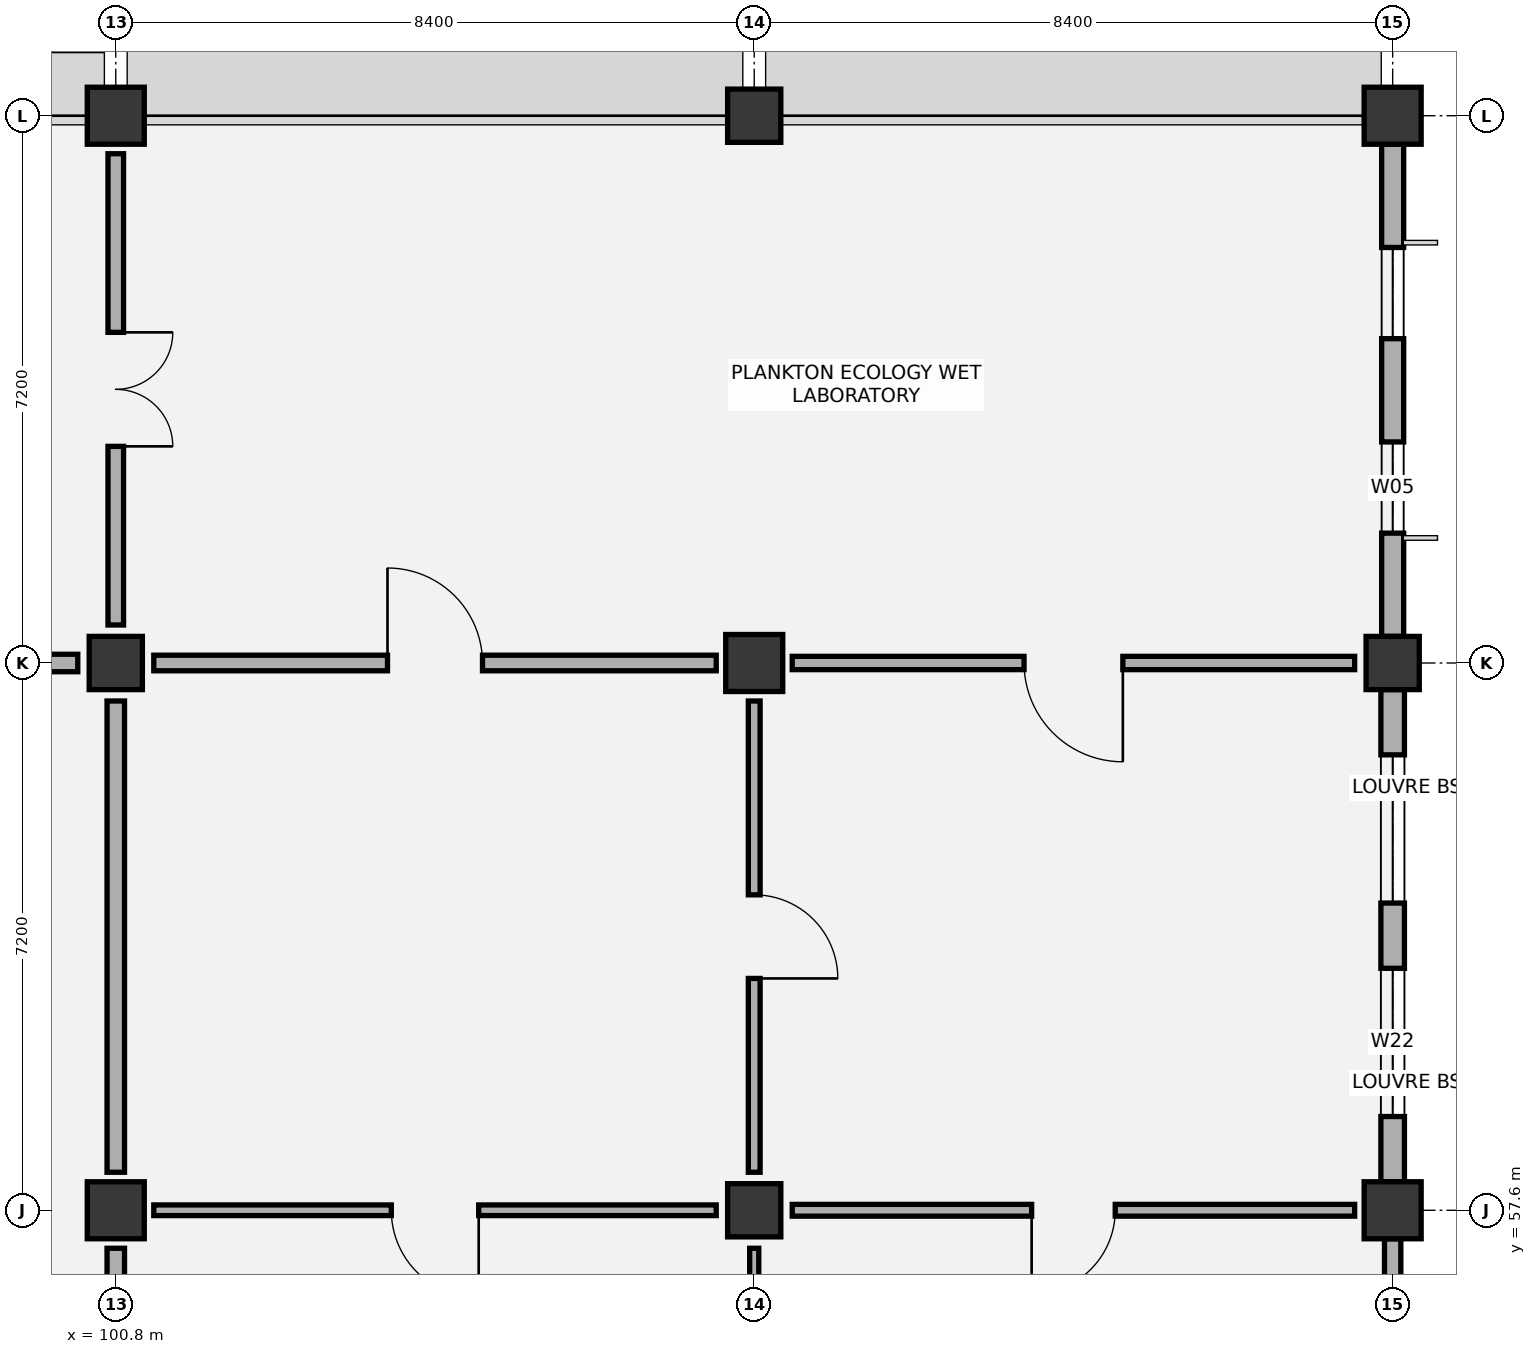
"""IFC4 building model, lengths in metres.
Left out: names, types, materials, properties, quantities, classifications, styles, units other than length and angle.
Written with IfcOpenShell. Run it as: python <this file> out.ifc"""

import sys

from ifc_helpers import new_model, si_unit, direction, frame, frame_2d, origin, origin_2d, place, context, subcontext, project, spatial, rectangle, extrude, element, fill, save


model = new_model("IFC4")
c1 = context("Model", 3, precision=1e-05, world=origin(), true_north=direction((0.0, 1.0)))
c2 = subcontext(c1, "Body", "Model", "MODEL_VIEW")
j1 = project(units=[si_unit("LENGTHUNIT", "METRE"), si_unit("PLANEANGLEUNIT", "RADIAN")], contexts=[c1])
p1 = place(None, origin())
s1 = spatial("IfcSite", under=j1, at=p1, CompositionType="ELEMENT")
p2 = place(p1, origin())
s2 = spatial("IfcBuilding", under=s1, at=p2, CompositionType="ELEMENT")
p3 = place(p2, frame((0.0, 0.0, 31.2)))
s3 = spatial("IfcBuildingStorey", under=s2, at=p3, CompositionType="ELEMENT", Elevation=31.2)
p4 = place(p3, frame((100.8, 57.6, 0.0), z_axis=(0.0, 0.0, 1.0), x_axis=(1.0, 0.0, 0.0)))
e1 = element("IfcColumn", 1, at=p4, inside=s3, PredefinedType="COLUMN", context=c2, shape_type="SweptSolid", body=[
    extrude(rectangle(XDim=0.75, YDim=0.75, at=origin_2d()), origin(), (0.0, 0.0, 1.0), 4.2),
])
p5 = place(p3, frame((100.8, 64.8, 0.0), z_axis=(0.0, 0.0, 1.0), x_axis=(1.0, 0.0, 0.0)))
e2 = element("IfcColumn", 2, at=p5, inside=s3, PredefinedType="COLUMN", context=c2, shape_type="SweptSolid", body=[
    extrude(rectangle(XDim=0.7, YDim=0.7, at=origin_2d()), origin(), (0.0, 0.0, 1.0), 4.2),
])
p6 = place(p3, frame((100.8, 72.0, 0.0), z_axis=(0.0, 0.0, 1.0), x_axis=(1.0, 0.0, 0.0)))
e3 = element("IfcColumn", 3, at=p6, inside=s3, PredefinedType="COLUMN", context=c2, shape_type="SweptSolid", body=[
    extrude(rectangle(XDim=0.75, YDim=0.75, at=origin_2d()), origin(), (0.0, 0.0, 1.0), 4.2),
])
p7 = place(p3, frame((109.2, 57.6, 0.0), z_axis=(0.0, 0.0, 1.0), x_axis=(1.0, 0.0, 0.0)))
e4 = element("IfcColumn", 4, at=p7, inside=s3, PredefinedType="COLUMN", context=c2, shape_type="SweptSolid", body=[
    extrude(rectangle(XDim=0.7, YDim=0.7, at=origin_2d()), origin(), (0.0, 0.0, 1.0), 4.2),
])
p8 = place(p3, frame((109.2, 64.8, 0.0), z_axis=(0.0, 0.0, 1.0), x_axis=(1.0, 0.0, 0.0)))
e5 = element("IfcColumn", 5, at=p8, inside=s3, PredefinedType="COLUMN", context=c2, shape_type="SweptSolid", body=[
    extrude(rectangle(XDim=0.75, YDim=0.75, at=origin_2d()), origin(), (0.0, 0.0, 1.0), 4.2),
])
p9 = place(p3, frame((109.2, 72.0, 0.0), z_axis=(0.0, 0.0, 1.0), x_axis=(1.0, 0.0, 0.0)))
e6 = element("IfcColumn", 6, at=p9, inside=s3, PredefinedType="COLUMN", context=c2, shape_type="SweptSolid", body=[
    extrude(rectangle(XDim=0.7, YDim=0.7, at=origin_2d()), origin(), (0.0, 0.0, 1.0), 4.2),
])
p10 = place(p3, frame((117.6, 57.6, 0.0), z_axis=(0.0, 0.0, 1.0), x_axis=(1.0, 0.0, 0.0)))
e7 = element("IfcColumn", 7, at=p10, inside=s3, PredefinedType="COLUMN", context=c2, shape_type="SweptSolid", body=[
    extrude(rectangle(XDim=0.75, YDim=0.75, at=origin_2d()), origin(), (0.0, 0.0, 1.0), 4.2),
])
p11 = place(p3, frame((117.6, 64.8, 0.0), z_axis=(0.0, 0.0, 1.0), x_axis=(1.0, 0.0, 0.0)))
e8 = element("IfcColumn", 8, at=p11, inside=s3, PredefinedType="COLUMN", context=c2, shape_type="SweptSolid", body=[
    extrude(rectangle(XDim=0.7, YDim=0.7, at=origin_2d()), origin(), (0.0, 0.0, 1.0), 4.2),
])
p12 = place(p3, frame((117.6, 72.0, 0.0), z_axis=(0.0, 0.0, 1.0), x_axis=(1.0, 0.0, 0.0)))
e9 = element("IfcColumn", 9, at=p12, inside=s3, PredefinedType="COLUMN", context=c2, shape_type="SweptSolid", body=[
    extrude(rectangle(XDim=0.75, YDim=0.75, at=origin_2d()), origin(), (0.0, 0.0, 1.0), 4.2),
])
p13 = place(p3, frame((117.6, 50.75, 0.0), z_axis=(0.0, 0.0, 1.0), x_axis=(0.0, 1.0, 0.0)))
e10 = element("IfcWall", 10, at=p13, inside=s3, PredefinedType="SOLIDWALL", context=c2, shape_type="SweptSolid", body=[
    extrude(rectangle(XDim=6.475, YDim=0.215, at=frame_2d((3.238, 0.0))), origin(), (0.0, 0.0, 1.0), 3.365),
])
p14 = place(p3, frame((117.6, 57.975, 0.0), z_axis=(0.0, 0.0, 1.0), x_axis=(0.0, 1.0, 0.0)))
e11 = element("IfcWall", 11, at=p14, inside=s3, PredefinedType="SOLIDWALL", context=c2, shape_type="SweptSolid", body=[
    extrude(rectangle(XDim=6.475, YDim=0.31, at=frame_2d((3.237, 0.0))), origin(), (0.0, 0.0, 1.0), 3.365),
])
p15 = place(p14, frame((0.858, 0.0, 0.9)))
e12 = element("IfcOpeningElement", 12, at=p15, cuts=e11, PredefinedType="OPENING", context=c2, shape_type="SweptSolid", body=[
    extrude(rectangle(XDim=1.95, YDim=1.95, at=frame_2d((0.975, 0.975))), frame((0.0, 0.165, 0.0), z_axis=(0.0, -1.0, 0.0), x_axis=(1.0, 0.0, 0.0)), (0.0, 0.0, 1.0), 0.33),
])
p16 = place(p14, frame((3.667, 0.0, 0.9)))
e13 = element("IfcOpeningElement", 13, at=p16, cuts=e11, PredefinedType="OPENING", context=c2, shape_type="SweptSolid", body=[
    extrude(rectangle(XDim=1.95, YDim=1.95, at=frame_2d((0.975, 0.975))), frame((0.0, 0.165, 0.0), z_axis=(0.0, -1.0, 0.0), x_axis=(1.0, 0.0, 0.0)), (0.0, 0.0, 1.0), 0.33),
])
p17 = place(p3, frame((117.6, 65.15, 0.0), z_axis=(0.0, 0.0, 1.0), x_axis=(0.0, 1.0, 0.0)))
e14 = element("IfcWall", 14, at=p17, inside=s3, PredefinedType="SOLIDWALL", context=c2, shape_type="SweptSolid", body=[
    extrude(rectangle(XDim=6.475, YDim=0.29, at=frame_2d((3.238, 0.0))), origin(), (0.0, 0.0, 1.0), 3.365),
])
p18 = place(p17, frame((1.358, 0.0, 0.9)))
e15 = element("IfcOpeningElement", 15, at=p18, cuts=e14, PredefinedType="OPENING", context=c2, shape_type="SweptSolid", body=[
    extrude(rectangle(XDim=1.2, YDim=1.8, at=frame_2d((0.6, 0.9))), frame((0.0, 0.155, 0.0), z_axis=(0.0, -1.0, 0.0), x_axis=(1.0, 0.0, 0.0)), (0.0, 0.0, 1.0), 0.31),
])
p19 = place(p17, frame((3.917, 0.0, 0.9)))
e16 = element("IfcOpeningElement", 16, at=p19, cuts=e14, PredefinedType="OPENING", context=c2, shape_type="SweptSolid", body=[
    extrude(rectangle(XDim=1.2, YDim=1.8, at=frame_2d((0.6, 0.9))), frame((0.0, 0.155, 0.0), z_axis=(0.0, -1.0, 0.0), x_axis=(1.0, 0.0, 0.0)), (0.0, 0.0, 1.0), 0.31),
])
p20 = place(p3, frame((100.8, 50.9, 0.0), z_axis=(0.0, 0.0, 1.0), x_axis=(0.0, 1.0, 0.0)))
e17 = element("IfcWall", 17, at=p20, inside=s3, PredefinedType="PARTITIONING", context=c2, shape_type="SweptSolid", body=[
    extrude(rectangle(XDim=6.2, YDim=0.23, at=frame_2d((3.1, 0.0))), origin(), (0.0, 0.0, 1.0), 3.315),
])
p21 = place(p3, frame((100.8, 58.1, 0.0), z_axis=(0.0, 0.0, 1.0), x_axis=(0.0, 1.0, 0.0)))
e18 = element("IfcWall", 18, at=p21, inside=s3, PredefinedType="PARTITIONING", context=c2, shape_type="SweptSolid", body=[
    extrude(rectangle(XDim=6.2, YDim=0.23, at=frame_2d((3.1, 0.0))), origin(), (0.0, 0.0, 1.0), 3.625),
])
p22 = place(p3, frame((92.9, 64.8, 0.0), z_axis=(0.0, 0.0, 1.0), x_axis=(1.0, 0.0, 0.0)))
e19 = element("IfcWall", 19, at=p22, inside=s3, PredefinedType="PARTITIONING", context=c2, shape_type="SweptSolid", body=[
    extrude(rectangle(XDim=7.4, YDim=0.23, at=frame_2d((3.7, 0.0))), origin(), (0.0, 0.0, 1.0), 3.265),
])
p23 = place(p3, frame((100.8, 65.3, 0.0), z_axis=(0.0, 0.0, 1.0), x_axis=(0.0, 1.0, 0.0)))
e20 = element("IfcWall", 20, at=p23, inside=s3, PredefinedType="PARTITIONING", context=c2, shape_type="SweptSolid", body=[
    extrude(rectangle(XDim=6.2, YDim=0.205, at=frame_2d((3.1, 0.0))), origin(), (0.0, 0.0, 1.0), 3.315),
])
p24 = place(p23, frame((2.35, 0.0, 0.0)))
e21 = element("IfcOpeningElement", 21, at=p24, cuts=e20, PredefinedType="OPENING", context=c2, shape_type="SweptSolid", body=[
    extrude(rectangle(XDim=1.5, YDim=2.2, at=frame_2d((0.75, 1.1))), frame((0.0, 0.113, 0.0), z_axis=(0.0, -1.0, 0.0), x_axis=(1.0, 0.0, 0.0)), (0.0, 0.0, 1.0), 0.225),
])
p25 = place(p3, frame((109.2, 50.9, 0.0), z_axis=(0.0, 0.0, 1.0), x_axis=(0.0, 1.0, 0.0)))
e22 = element("IfcWall", 22, at=p25, inside=s3, PredefinedType="PARTITIONING", context=c2, shape_type="SweptSolid", body=[
    extrude(rectangle(XDim=6.2, YDim=0.12, at=frame_2d((3.1, 0.0))), origin(), (0.0, 0.0, 1.0), 3.625),
])
p26 = place(p3, frame((101.3, 57.6, 0.0), z_axis=(0.0, 0.0, 1.0), x_axis=(1.0, 0.0, 0.0)))
e23 = element("IfcWall", 23, at=p26, inside=s3, PredefinedType="PARTITIONING", context=c2, shape_type="SweptSolid", body=[
    extrude(rectangle(XDim=7.4, YDim=0.14, at=frame_2d((3.7, 0.0))), origin(), (0.0, 0.0, 1.0), 3.265),
])
p27 = place(p26, frame((3.125, 0.0, 0.0)))
e24 = element("IfcOpeningElement", 24, at=p27, cuts=e23, PredefinedType="OPENING", context=c2, shape_type="SweptSolid", body=[
    extrude(rectangle(XDim=1.15, YDim=2.1, at=frame_2d((0.575, 1.05))), frame((0.0, 0.08, 0.0), z_axis=(0.0, -1.0, 0.0), x_axis=(1.0, 0.0, 0.0)), (0.0, 0.0, 1.0), 0.16),
])
p28 = place(p3, frame((109.2, 58.1, 0.0), z_axis=(0.0, 0.0, 1.0), x_axis=(0.0, 1.0, 0.0)))
e25 = element("IfcWall", 25, at=p28, inside=s3, PredefinedType="PARTITIONING", context=c2, shape_type="SweptSolid", body=[
    extrude(rectangle(XDim=6.2, YDim=0.155, at=frame_2d((3.1, 0.0))), origin(), (0.0, 0.0, 1.0), 3.315),
])
p29 = place(p28, frame((2.55, 0.0, 0.0)))
e26 = element("IfcOpeningElement", 26, at=p29, cuts=e25, PredefinedType="OPENING", context=c2, shape_type="SweptSolid", body=[
    extrude(rectangle(XDim=1.1, YDim=2.1, at=frame_2d((0.55, 1.05))), frame((0.0, 0.087, 0.0), z_axis=(0.0, -1.0, 0.0), x_axis=(1.0, 0.0, 0.0)), (0.0, 0.0, 1.0), 0.175),
])
p30 = place(p3, frame((101.3, 64.8, 0.0), z_axis=(0.0, 0.0, 1.0), x_axis=(1.0, 0.0, 0.0)))
e27 = element("IfcWall", 27, at=p30, inside=s3, PredefinedType="PARTITIONING", context=c2, shape_type="SweptSolid", body=[
    extrude(rectangle(XDim=7.4, YDim=0.205, at=frame_2d((3.7, 0.0))), origin(), (0.0, 0.0, 1.0), 3.265),
])
p31 = place(p30, frame((3.075, 0.0, 0.0)))
e28 = element("IfcOpeningElement", 28, at=p31, cuts=e27, PredefinedType="OPENING", context=c2, shape_type="SweptSolid", body=[
    extrude(rectangle(XDim=1.25, YDim=2.1, at=frame_2d((0.625, 1.05))), frame((0.0, 0.113, 0.0), z_axis=(0.0, -1.0, 0.0), x_axis=(1.0, 0.0, 0.0)), (0.0, 0.0, 1.0), 0.225),
])
p32 = place(p3, frame((109.7, 57.6, 0.0), z_axis=(0.0, 0.0, 1.0), x_axis=(1.0, 0.0, 0.0)))
e29 = element("IfcWall", 29, at=p32, inside=s3, PredefinedType="PARTITIONING", context=c2, shape_type="SweptSolid", body=[
    extrude(rectangle(XDim=7.4, YDim=0.155, at=frame_2d((3.7, 0.0))), origin(), (0.0, 0.0, 1.0), 3.265),
])
p33 = place(p32, frame((3.15, 0.0, 0.0)))
e30 = element("IfcOpeningElement", 30, at=p33, cuts=e29, PredefinedType="OPENING", context=c2, shape_type="SweptSolid", body=[
    extrude(rectangle(XDim=1.1, YDim=2.1, at=frame_2d((0.55, 1.05))), frame((0.0, 0.087, 0.0), z_axis=(0.0, -1.0, 0.0), x_axis=(1.0, 0.0, 0.0)), (0.0, 0.0, 1.0), 0.175),
])
p34 = place(p3, frame((109.7, 64.8, 0.0), z_axis=(0.0, 0.0, 1.0), x_axis=(1.0, 0.0, 0.0)))
e31 = element("IfcWall", 31, at=p34, inside=s3, PredefinedType="PARTITIONING", context=c2, shape_type="SweptSolid", body=[
    extrude(rectangle(XDim=7.4, YDim=0.175, at=frame_2d((3.7, 0.0))), origin(), (0.0, 0.0, 1.0), 3.265),
])
p35 = place(p34, frame((3.05, 0.0, 0.0)))
e32 = element("IfcOpeningElement", 32, at=p35, cuts=e31, PredefinedType="OPENING", context=c2, shape_type="SweptSolid", body=[
    extrude(rectangle(XDim=1.3, YDim=2.15, at=frame_2d((0.65, 1.075))), frame((0.0, 0.097, 0.0), z_axis=(0.0, -1.0, 0.0), x_axis=(1.0, 0.0, 0.0)), (0.0, 0.0, 1.0), 0.195),
])
p36 = place(p15, origin())
e33 = element("IfcWindow", 33, at=p36, inside=s3, PartitioningType="SINGLE_PANEL", PredefinedType="WINDOW", context=c2, shape_type="SweptSolid", body=[
    extrude(rectangle(XDim=1.95, YDim=1.95, at=frame_2d((0.975, 0.975))), frame((0.0, 0.03, 0.0), z_axis=(0.0, -1.0, 0.0), x_axis=(1.0, 0.0, 0.0)), (0.0, 0.0, 1.0), 0.06),
])
fill(e12, e33)
p37 = place(p16, origin())
e34 = element("IfcWindow", 34, at=p37, inside=s3, PartitioningType="SINGLE_PANEL", PredefinedType="WINDOW", context=c2, shape_type="SweptSolid", body=[
    extrude(rectangle(XDim=1.95, YDim=1.95, at=frame_2d((0.975, 0.975))), frame((0.0, 0.03, 0.0), z_axis=(0.0, -1.0, 0.0), x_axis=(1.0, 0.0, 0.0)), (0.0, 0.0, 1.0), 0.06),
])
fill(e13, e34)
p38 = place(p18, origin())
e35 = element("IfcWindow", 35, at=p38, inside=s3, PartitioningType="SINGLE_PANEL", PredefinedType="WINDOW", context=c2, shape_type="SweptSolid", body=[
    extrude(rectangle(XDim=1.2, YDim=1.8, at=frame_2d((0.6, 0.9))), frame((0.0, 0.03, 0.0), z_axis=(0.0, -1.0, 0.0), x_axis=(1.0, 0.0, 0.0)), (0.0, 0.0, 1.0), 0.06),
])
fill(e15, e35)
p39 = place(p19, origin())
e36 = element("IfcWindow", 36, at=p39, inside=s3, PartitioningType="SINGLE_PANEL", PredefinedType="WINDOW", context=c2, shape_type="SweptSolid", body=[
    extrude(rectangle(XDim=1.2, YDim=1.8, at=frame_2d((0.6, 0.9))), frame((0.0, 0.03, 0.0), z_axis=(0.0, -1.0, 0.0), x_axis=(1.0, 0.0, 0.0)), (0.0, 0.0, 1.0), 0.06),
])
fill(e16, e36)
p40 = place(p24, frame((1.5, 0.0, 0.0), z_axis=(0.0, 0.0, 1.0), x_axis=(-1.0, 0.0, 0.0)))
e37 = element("IfcDoor", 37, at=p40, inside=s3, OperationType="DOUBLE_DOOR_SINGLE_SWING", PredefinedType="DOOR", context=c2, shape_type="SweptSolid", body=[
    extrude(rectangle(XDim=1.5, YDim=2.2, at=frame_2d((0.75, 1.1))), frame((0.0, 0.025, 0.0), z_axis=(0.0, -1.0, 0.0), x_axis=(1.0, 0.0, 0.0)), (0.0, 0.0, 1.0), 0.05),
])
fill(e21, e37)
p41 = place(p27, frame((1.15, 0.0, 0.0), z_axis=(0.0, 0.0, 1.0), x_axis=(-1.0, 0.0, 0.0)))
e38 = element("IfcDoor", 38, at=p41, inside=s3, OperationType="SINGLE_SWING_LEFT", PredefinedType="DOOR", context=c2, shape_type="SweptSolid", body=[
    extrude(rectangle(XDim=1.15, YDim=2.1, at=frame_2d((0.575, 1.05))), frame((0.0, 0.025, 0.0), z_axis=(0.0, -1.0, 0.0), x_axis=(1.0, 0.0, 0.0)), (0.0, 0.0, 1.0), 0.05),
])
fill(e24, e38)
p42 = place(p29, frame((1.1, 0.0, 0.0), z_axis=(0.0, 0.0, 1.0), x_axis=(-1.0, 0.0, 0.0)))
e39 = element("IfcDoor", 39, at=p42, inside=s3, OperationType="SINGLE_SWING_RIGHT", PredefinedType="DOOR", context=c2, shape_type="SweptSolid", body=[
    extrude(rectangle(XDim=1.1, YDim=2.1, at=frame_2d((0.55, 1.05))), frame((0.0, 0.025, 0.0), z_axis=(0.0, -1.0, 0.0), x_axis=(1.0, 0.0, 0.0)), (0.0, 0.0, 1.0), 0.05),
])
fill(e26, e39)
p43 = place(p31, origin())
e40 = element("IfcDoor", 40, at=p43, inside=s3, OperationType="SINGLE_SWING_LEFT", PredefinedType="DOOR", context=c2, shape_type="SweptSolid", body=[
    extrude(rectangle(XDim=1.25, YDim=2.1, at=frame_2d((0.625, 1.05))), frame((0.0, 0.025, 0.0), z_axis=(0.0, -1.0, 0.0), x_axis=(1.0, 0.0, 0.0)), (0.0, 0.0, 1.0), 0.05),
])
fill(e28, e40)
p44 = place(p33, frame((1.1, 0.0, 0.0), z_axis=(0.0, 0.0, 1.0), x_axis=(-1.0, 0.0, 0.0)))
e41 = element("IfcDoor", 41, at=p44, inside=s3, OperationType="SINGLE_SWING_RIGHT", PredefinedType="DOOR", context=c2, shape_type="SweptSolid", body=[
    extrude(rectangle(XDim=1.1, YDim=2.1, at=frame_2d((0.55, 1.05))), frame((0.0, 0.025, 0.0), z_axis=(0.0, -1.0, 0.0), x_axis=(1.0, 0.0, 0.0)), (0.0, 0.0, 1.0), 0.05),
])
fill(e30, e41)
p45 = place(p35, frame((1.3, 0.0, 0.0), z_axis=(0.0, 0.0, 1.0), x_axis=(-1.0, 0.0, 0.0)))
e42 = element("IfcDoor", 42, at=p45, inside=s3, OperationType="SINGLE_SWING_LEFT", PredefinedType="DOOR", context=c2, shape_type="SweptSolid", body=[
    extrude(rectangle(XDim=1.3, YDim=2.15, at=frame_2d((0.65, 1.075))), frame((0.0, 0.025, 0.0), z_axis=(0.0, -1.0, 0.0), x_axis=(1.0, 0.0, 0.0)), (0.0, 0.0, 1.0), 0.05),
])
fill(e32, e42)
save(model, sys.argv[1])
